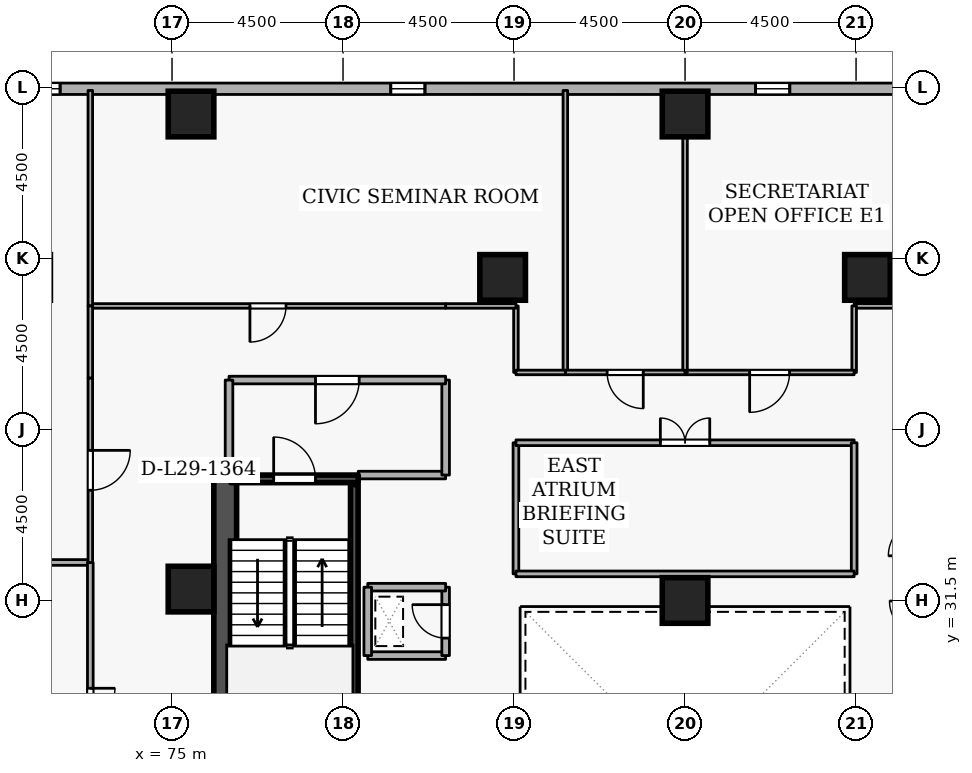
"""IFC4 building model, lengths in metres.
Left out: names, types, materials, properties, quantities, classifications, styles, units other than length and angle.
Written with IfcOpenShell. Run it as: python <this file> out.ifc"""

import sys

from ifc_helpers import new_model, si_unit, direction, frame, frame_2d, origin, origin_2d, place, context, subcontext, project, spatial, rectangle, extrude, element, fill, save


model = new_model("IFC4")
c1 = context("Model", 3, precision=1e-05, world=origin(), true_north=direction((0.0, 1.0)))
c2 = subcontext(c1, "Body", "Model", "MODEL_VIEW")
j1 = project(units=[si_unit("LENGTHUNIT", "METRE"), si_unit("PLANEANGLEUNIT", "RADIAN")], contexts=[c1])
p1 = place(None, origin())
s1 = spatial("IfcSite", under=j1, at=p1, CompositionType="ELEMENT")
p2 = place(p1, origin())
s2 = spatial("IfcBuilding", under=s1, at=p2, CompositionType="ELEMENT")
p3 = place(p2, frame((0.0, 0.0, 112.5)))
s3 = spatial("IfcBuildingStorey", under=s2, at=p3, CompositionType="ELEMENT", Elevation=112.5)
p4 = place(p3, frame((76.4, 19.2, 0.0), z_axis=(0.0, 0.0, 1.0), x_axis=(0.0, 1.0, 0.0)))
e1 = element("IfcWall", 1, at=p4, inside=s3, PredefinedType="SHEAR", context=c2, shape_type="SweptSolid", body=[
    extrude(rectangle(XDim=15.6, YDim=0.6, at=frame_2d((7.8, 0.0))), origin(), (0.0, 0.0, 1.0), 3.6),
])
for number, where, z_axis, x_axis in (
    (2, (88.5, 44.3, 0.0), (0.0, 0.0, 1.0), (1.0, 0.0, 0.0)),
    (3, (75.5, 44.3, 0.0), (0.0, 0.0, 1.0), (1.0, 0.0, 0.0)),
    (4, (93.3, 40.0, 0.0), (0.0, 0.0, 1.0), (1.0, 0.0, 0.0)),
    (5, (83.7, 40.0, 0.0), (0.0, 0.0, 1.0), (1.0, 0.0, 0.0)),
    (6, (75.5, 31.8, 0.0), (0.0, 0.0, 1.0), (1.0, 0.0, 0.0)),
    (7, (88.5, 31.5, 0.0), (0.0, 0.0, 1.0), (1.0, 0.0, 0.0)),
):
    element("IfcColumn", number, at=place(p3, frame(where, z_axis=z_axis, x_axis=x_axis)), inside=s3, PredefinedType="COLUMN", context=c2, shape_type="SweptSolid", body=[
        extrude(rectangle(XDim=1.2, YDim=1.2, at=origin_2d()), origin(), (0.0, 0.0, 1.0), 3.6),
    ])
p5 = place(p3, frame((103.555, 44.964, 0.0), z_axis=(0.0, 0.0, 1.0), x_axis=(-0.999999999641, 2.6801568e-05, 0.0)))
e8 = element("IfcWall", 8, at=p5, inside=s3, PredefinedType="STANDARD", context=c2, shape_type="SweptSolid", body=[
    extrude(rectangle(XDim=36.437, YDim=0.3, at=frame_2d((18.218, 0.0))), origin(), (0.0, 0.0, 1.0), 2.7),
])
p6 = place(p5, frame((7.5, 0.0, 0.72)))
e9 = element("IfcOpeningElement", 9, at=p6, cuts=e8, PredefinedType="OPENING", context=c2, shape_type="SweptSolid", body=[
    extrude(rectangle(XDim=0.9, YDim=1.75, at=frame_2d((0.45, 0.875))), frame((0.0, 0.16, 0.0), z_axis=(0.0, -1.0, 0.0), x_axis=(1.0, 0.0, 0.0)), (0.0, 0.0, 1.0), 0.32),
])
p7 = place(p5, frame((12.3, 0.0, 0.72)))
e10 = element("IfcOpeningElement", 10, at=p7, cuts=e8, PredefinedType="OPENING", context=c2, shape_type="SweptSolid", body=[
    extrude(rectangle(XDim=0.9, YDim=1.75, at=frame_2d((0.45, 0.875))), frame((0.0, 0.16, 0.0), z_axis=(0.0, -1.0, 0.0), x_axis=(1.0, 0.0, 0.0)), (0.0, 0.0, 1.0), 0.32),
])
p8 = place(p5, frame((21.9, 0.0, 0.72)))
e11 = element("IfcOpeningElement", 11, at=p8, cuts=e8, PredefinedType="OPENING", context=c2, shape_type="SweptSolid", body=[
    extrude(rectangle(XDim=0.9, YDim=1.75, at=frame_2d((0.45, 0.875))), frame((0.0, 0.16, 0.0), z_axis=(0.0, -1.0, 0.0), x_axis=(1.0, 0.0, 0.0)), (0.0, 0.0, 1.0), 0.32),
])
p9 = place(p5, frame((31.5, 0.0, 0.72)))
e12 = element("IfcOpeningElement", 12, at=p9, cuts=e8, PredefinedType="OPENING", context=c2, shape_type="SweptSolid", body=[
    extrude(rectangle(XDim=0.9, YDim=1.75, at=frame_2d((0.45, 0.875))), frame((0.0, 0.16, 0.0), z_axis=(0.0, -1.0, 0.0), x_axis=(1.0, 0.0, 0.0)), (0.0, 0.0, 1.0), 0.32),
])
p10 = place(p3, frame((76.55, 34.7, 0.0), z_axis=(0.0, 0.0, 1.0), x_axis=(1.0, 0.0, 0.0)))
e13 = element("IfcWall", 13, at=p10, inside=s3, PredefinedType="SHEAR", context=c2, shape_type="SweptSolid", body=[
    extrude(rectangle(XDim=3.35, YDim=0.2, at=frame_2d((1.675, 0.0))), origin(), (0.0, 0.0, 1.0), 3.6),
])
p11 = place(p10, frame((1.125, 0.0, 0.0)))
e14 = element("IfcOpeningElement", 14, at=p11, cuts=e13, PredefinedType="OPENING", context=c2, shape_type="SweptSolid", body=[
    extrude(rectangle(XDim=1.1, YDim=2.1, at=frame_2d((0.55, 1.05))), frame((0.0, 0.11, 0.0), z_axis=(0.0, -1.0, 0.0), x_axis=(1.0, 0.0, 0.0)), (0.0, 0.0, 1.0), 0.22),
])
p12 = place(p3, frame((79.797, 27.45, 0.0), z_axis=(0.0, 0.0, 1.0), x_axis=(0.0, 1.0, 0.0)))
e15 = element("IfcWall", 15, at=p12, inside=s3, PredefinedType="SHEAR", context=c2, shape_type="SweptSolid", body=[
    extrude(rectangle(XDim=7.1, YDim=0.2, at=frame_2d((3.55, 0.0))), origin(), (0.0, 0.0, 1.0), 3.6),
])
p13 = place(p3, frame((79.9, 34.8, 0.0), z_axis=(0.0, 0.0, 1.0), x_axis=(1.0, 0.0, 0.0)))
e16 = element("IfcWall", 16, at=p13, inside=s3, PredefinedType="STANDARD", context=c2, shape_type="SweptSolid", body=[
    extrude(rectangle(XDim=2.3, YDim=0.2, at=frame_2d((1.15, 0.0))), origin(), (0.0, 0.0, 1.0), 2.545),
])
p14 = place(p3, frame((82.2, 34.8, 0.0), z_axis=(0.0, 0.0, 1.0), x_axis=(0.0, 1.0, 0.0)))
e17 = element("IfcWall", 17, at=p14, inside=s3, PredefinedType="STANDARD", context=c2, shape_type="SweptSolid", body=[
    extrude(rectangle(XDim=2.5, YDim=0.2, at=frame_2d((1.25, 0.0))), origin(), (0.0, 0.0, 1.0), 3.34),
])
p15 = place(p3, frame((82.2, 37.3, 0.0), z_axis=(0.0, 0.0, 1.0), x_axis=(-1.0, 0.0, 0.0)))
e18 = element("IfcWall", 18, at=p15, inside=s3, PredefinedType="STANDARD", context=c2, shape_type="SweptSolid", body=[
    extrude(rectangle(XDim=5.7, YDim=0.2, at=frame_2d((2.85, 0.0))), origin(), (0.0, 0.0, 1.0), 3.34),
])
p16 = place(p15, frame((2.275, 0.0, 0.0)))
e19 = element("IfcOpeningElement", 19, at=p16, cuts=e18, PredefinedType="OPENING", context=c2, shape_type="SweptSolid", body=[
    extrude(rectangle(XDim=1.15, YDim=2.1, at=frame_2d((0.575, 1.05))), frame((0.0, 0.11, 0.0), z_axis=(0.0, -1.0, 0.0), x_axis=(1.0, 0.0, 0.0)), (0.0, 0.0, 1.0), 0.22),
])
p17 = place(p3, frame((76.5, 37.3, 0.0), z_axis=(0.0, 0.0, 1.0), x_axis=(0.0, -1.0, 0.0)))
e20 = element("IfcWall", 20, at=p17, inside=s3, PredefinedType="STANDARD", context=c2, shape_type="SweptSolid", body=[
    extrude(rectangle(XDim=2.5, YDim=0.2, at=frame_2d((1.25, 0.0))), origin(), (0.0, 0.0, 1.0), 3.34),
])
p18 = place(p3, frame((80.15, 30.05, 0.0), z_axis=(0.0, 0.0, 1.0), x_axis=(1.0, 0.0, 0.0)))
e21 = element("IfcWall", 21, at=p18, inside=s3, PredefinedType="STANDARD", context=c2, shape_type="SweptSolid", body=[
    extrude(rectangle(XDim=2.05, YDim=0.2, at=frame_2d((1.025, 0.0))), origin(), (0.0, 0.0, 1.0), 3.34),
])
p19 = place(p3, frame((82.2, 30.05, 0.0), z_axis=(0.0, 0.0, 1.0), x_axis=(0.0, 1.0, 0.0)))
e22 = element("IfcWall", 22, at=p19, inside=s3, PredefinedType="STANDARD", context=c2, shape_type="SweptSolid", body=[
    extrude(rectangle(XDim=1.8, YDim=0.2, at=frame_2d((0.9, 0.0))), origin(), (0.0, 0.0, 1.0), 3.34),
])
p20 = place(p19, frame((0.46, 0.0, 0.0)))
e23 = element("IfcOpeningElement", 23, at=p20, cuts=e22, PredefinedType="OPENING", context=c2, shape_type="SweptSolid", body=[
    extrude(rectangle(XDim=0.88, YDim=2.04, at=frame_2d((0.44, 1.02))), frame((0.0, 0.11, 0.0), z_axis=(0.0, -1.0, 0.0), x_axis=(1.0, 0.0, 0.0)), (0.0, 0.0, 1.0), 0.22),
])
p21 = place(p3, frame((82.2, 31.85, 0.0), z_axis=(0.0, 0.0, 1.0), x_axis=(-1.0, 0.0, 0.0)))
e24 = element("IfcWall", 24, at=p21, inside=s3, PredefinedType="STANDARD", context=c2, shape_type="SweptSolid", body=[
    extrude(rectangle(XDim=2.05, YDim=0.2, at=frame_2d((1.025, 0.0))), origin(), (0.0, 0.0, 1.0), 3.34),
])
p22 = place(p3, frame((80.15, 31.85, 0.0), z_axis=(0.0, 0.0, 1.0), x_axis=(0.0, -1.0, 0.0)))
e25 = element("IfcWall", 25, at=p22, inside=s3, PredefinedType="STANDARD", context=c2, shape_type="SweptSolid", body=[
    extrude(rectangle(XDim=1.8, YDim=0.2, at=frame_2d((0.9, 0.0))), origin(), (0.0, 0.0, 1.0), 3.34),
])
p23 = place(p3, frame((94.8, 39.25, 0.0), z_axis=(0.0, 0.0, 1.0), x_axis=(-1.0, 0.0, 0.0)))
e26 = element("IfcWall", 26, at=p23, inside=s3, PredefinedType="PARTITIONING", context=c2, shape_type="SweptSolid", body=[
    extrude(rectangle(XDim=1.85, YDim=0.12, at=frame_2d((0.925, 0.0))), origin(), (0.0, 0.0, 1.0), 3.34),
])
p24 = place(p3, frame((92.95, 39.25, 0.0), z_axis=(0.0, 0.0, 1.0), x_axis=(0.0, -1.0, 0.0)))
e27 = element("IfcWall", 27, at=p24, inside=s3, PredefinedType="PARTITIONING", context=c2, shape_type="SweptSolid", body=[
    extrude(rectangle(XDim=1.75, YDim=0.12, at=frame_2d((0.875, 0.0))), origin(), (0.0, 0.0, 1.0), 3.34),
])
p25 = place(p3, frame((92.95, 37.5, 0.0), z_axis=(0.0, 0.0, 1.0), x_axis=(-1.0, 0.0, 0.0)))
e28 = element("IfcWall", 28, at=p25, inside=s3, PredefinedType="PARTITIONING", context=c2, shape_type="SweptSolid", body=[
    extrude(rectangle(XDim=4.45, YDim=0.12, at=frame_2d((2.225, 0.0))), origin(), (0.0, 0.0, 1.0), 3.34),
])
p26 = place(p25, frame((1.7, 0.0, 0.0)))
e29 = element("IfcOpeningElement", 29, at=p26, cuts=e28, PredefinedType="OPENING", context=c2, shape_type="SweptSolid", body=[
    extrude(rectangle(XDim=1.05, YDim=2.1, at=frame_2d((0.525, 1.05))), frame((0.0, 0.07, 0.0), z_axis=(0.0, -1.0, 0.0), x_axis=(1.0, 0.0, 0.0)), (0.0, 0.0, 1.0), 0.14),
])
p27 = place(p3, frame((88.5, 37.5, 0.0), z_axis=(0.0, 0.0, 1.0), x_axis=(0.0, 1.0, 0.0)))
e30 = element("IfcWall", 30, at=p27, inside=s3, PredefinedType="PARTITIONING", context=c2, shape_type="SweptSolid", body=[
    extrude(rectangle(XDim=7.42, YDim=0.12, at=frame_2d((3.71, 0.0))), origin(), (0.0, 0.0, 1.0), 2.882),
])
p28 = place(p3, frame((85.35, 37.5, 0.0), z_axis=(0.0, 0.0, 1.0), x_axis=(0.0, 1.0, 0.0)))
e31 = element("IfcWall", 31, at=p28, inside=s3, PredefinedType="PARTITIONING", context=c2, shape_type="SweptSolid", body=[
    extrude(rectangle(XDim=7.42, YDim=0.12, at=frame_2d((3.71, 0.0))), origin(), (0.0, 0.0, 1.0), 3.34),
])
p29 = place(p3, frame((88.5, 37.5, 0.0), z_axis=(0.0, 0.0, 1.0), x_axis=(-1.0, 0.0, 0.0)))
e32 = element("IfcWall", 32, at=p29, inside=s3, PredefinedType="PARTITIONING", context=c2, shape_type="SweptSolid", body=[
    extrude(rectangle(XDim=3.15, YDim=0.12, at=frame_2d((1.575, 0.0))), origin(), (0.0, 0.0, 1.0), 3.34),
])
p30 = place(p29, frame((1.1, 0.0, 0.0)))
e33 = element("IfcOpeningElement", 33, at=p30, cuts=e32, PredefinedType="OPENING", context=c2, shape_type="SweptSolid", body=[
    extrude(rectangle(XDim=0.95, YDim=2.1, at=frame_2d((0.475, 1.05))), frame((0.0, 0.07, 0.0), z_axis=(0.0, -1.0, 0.0), x_axis=(1.0, 0.0, 0.0)), (0.0, 0.0, 1.0), 0.14),
])
p31 = place(p3, frame((84.05, 37.5, 0.0), z_axis=(0.0, 0.0, 1.0), x_axis=(0.0, 1.0, 0.0)))
e34 = element("IfcWall", 34, at=p31, inside=s3, PredefinedType="PARTITIONING", context=c2, shape_type="SweptSolid", body=[
    extrude(rectangle(XDim=1.75, YDim=0.12, at=frame_2d((0.875, 0.0))), origin(), (0.0, 0.0, 1.0), 3.34),
])
p32 = place(p3, frame((84.05, 39.25, 0.0), z_axis=(0.0, 0.0, 1.0), x_axis=(-1.0, 0.0, 0.0)))
e35 = element("IfcWall", 35, at=p32, inside=s3, PredefinedType="PARTITIONING", context=c2, shape_type="SweptSolid", body=[
    extrude(rectangle(XDim=1.85, YDim=0.12, at=frame_2d((0.925, 0.0))), origin(), (0.0, 0.0, 1.0), 3.34),
])
p33 = place(p3, frame((82.2, 39.25, 0.0), z_axis=(0.0, 0.0, 1.0), x_axis=(-1.0, 0.0, 0.0)))
e36 = element("IfcWall", 36, at=p33, inside=s3, PredefinedType="PARTITIONING", context=c2, shape_type="SweptSolid", body=[
    extrude(rectangle(XDim=9.35, YDim=0.12, at=frame_2d((4.675, 0.0))), origin(), (0.0, 0.0, 1.0), 3.34),
])
p34 = place(p33, frame((4.2, 0.0, 0.0)))
e37 = element("IfcOpeningElement", 37, at=p34, cuts=e36, PredefinedType="OPENING", context=c2, shape_type="SweptSolid", body=[
    extrude(rectangle(XDim=0.95, YDim=2.1, at=frame_2d((0.475, 1.05))), frame((0.0, 0.07, 0.0), z_axis=(0.0, -1.0, 0.0), x_axis=(1.0, 0.0, 0.0)), (0.0, 0.0, 1.0), 0.14),
])
p35 = place(p3, frame((72.85, 39.25, 0.0), z_axis=(0.0, 0.0, 1.0), x_axis=(0.0, 1.0, 0.0)))
e38 = element("IfcWall", 38, at=p35, inside=s3, PredefinedType="PARTITIONING", context=c2, shape_type="SweptSolid", body=[
    extrude(rectangle(XDim=5.67, YDim=0.12, at=frame_2d((2.835, 0.0))), origin(), (0.0, 0.0, 1.0), 3.34),
])
p36 = place(p3, frame((85.35, 37.5, 0.0), z_axis=(0.0, 0.0, 1.0), x_axis=(-1.0, 0.0, 0.0)))
e39 = element("IfcWall", 39, at=p36, inside=s3, PredefinedType="PARTITIONING", context=c2, shape_type="SweptSolid", body=[
    extrude(rectangle(XDim=1.3, YDim=0.12, at=frame_2d((0.65, 0.0))), origin(), (0.0, 0.0, 1.0), 3.34),
])
p37 = place(p3, frame((84.05, 32.2, 0.0), z_axis=(0.0, 0.0, 1.0), x_axis=(0.0, 1.0, 0.0)))
e40 = element("IfcWall", 40, at=p37, inside=s3, PredefinedType="PARTITIONING", context=c2, shape_type="SweptSolid", body=[
    extrude(rectangle(XDim=3.45, YDim=0.15, at=frame_2d((1.725, 0.0))), origin(), (0.0, 0.0, 1.0), 3.34),
])
p38 = place(p3, frame((84.05, 35.65, 0.0), z_axis=(0.0, 0.0, 1.0), x_axis=(1.0, 0.0, 0.0)))
e41 = element("IfcWall", 41, at=p38, inside=s3, PredefinedType="PARTITIONING", context=c2, shape_type="SweptSolid", body=[
    extrude(rectangle(XDim=8.9, YDim=0.15, at=frame_2d((4.45, 0.0))), origin(), (0.0, 0.0, 1.0), 3.34),
])
p39 = place(p38, frame((3.8, 0.0, 0.0)))
e42 = element("IfcOpeningElement", 42, at=p39, cuts=e41, PredefinedType="OPENING", context=c2, shape_type="SweptSolid", body=[
    extrude(rectangle(XDim=1.3, YDim=2.12, at=frame_2d((0.65, 1.06))), frame((0.0, 0.085, 0.0), z_axis=(0.0, -1.0, 0.0), x_axis=(1.0, 0.0, 0.0)), (0.0, 0.0, 1.0), 0.17),
])
p40 = place(p3, frame((92.95, 35.65, 0.0), z_axis=(0.0, 0.0, 1.0), x_axis=(0.0, -1.0, 0.0)))
e43 = element("IfcWall", 43, at=p40, inside=s3, PredefinedType="PARTITIONING", context=c2, shape_type="SweptSolid", body=[
    extrude(rectangle(XDim=3.45, YDim=0.15, at=frame_2d((1.725, 0.0))), origin(), (0.0, 0.0, 1.0), 3.34),
])
p41 = place(p3, frame((92.95, 32.2, 0.0), z_axis=(0.0, 0.0, 1.0), x_axis=(-1.0, 0.0, 0.0)))
e44 = element("IfcWall", 44, at=p41, inside=s3, PredefinedType="PARTITIONING", context=c2, shape_type="SweptSolid", body=[
    extrude(rectangle(XDim=8.9, YDim=0.15, at=frame_2d((4.45, 0.0))), origin(), (0.0, 0.0, 1.0), 3.34),
])
p42 = place(p3, frame((64.58, 32.5, 0.0), z_axis=(0.0, 0.0, 1.0), x_axis=(1.0, 0.0, 0.0)))
e45 = element("IfcWall", 45, at=p42, inside=s3, PredefinedType="PARTITIONING", context=c2, shape_type="SweptSolid", body=[
    extrude(rectangle(XDim=8.27, YDim=0.15, at=frame_2d((4.135, 0.0))), origin(), (0.0, 0.0, 1.0), 3.34),
])
p43 = place(p3, frame((72.85, 32.5, 0.0), z_axis=(0.0, 0.0, 1.0), x_axis=(0.0, -1.0, 0.0)))
e46 = element("IfcWall", 46, at=p43, inside=s3, PredefinedType="PARTITIONING", context=c2, shape_type="SweptSolid", body=[
    extrude(rectangle(XDim=11.0, YDim=0.15, at=frame_2d((5.5, 0.0))), origin(), (0.0, 0.0, 1.0), 3.34),
])
p44 = place(p43, frame((3.31, 0.0, 0.0)))
e47 = element("IfcOpeningElement", 47, at=p44, cuts=e46, PredefinedType="OPENING", context=c2, shape_type="SweptSolid", body=[
    extrude(rectangle(XDim=1.3, YDim=2.12, at=frame_2d((0.65, 1.06))), frame((0.0, 0.085, 0.0), z_axis=(0.0, -1.0, 0.0), x_axis=(1.0, 0.0, 0.0)), (0.0, 0.0, 1.0), 0.17),
])
p45 = place(p3, frame((72.85, 39.25, 0.0), z_axis=(0.0, 0.0, 1.0), x_axis=(0.0, -1.0, 0.0)))
e48 = element("IfcWall", 48, at=p45, inside=s3, PredefinedType="PARTITIONING", context=c2, shape_type="SweptSolid", body=[
    extrude(rectangle(XDim=1.9, YDim=0.12, at=frame_2d((0.95, 0.0))), origin(), (0.0, 0.0, 1.0), 3.34),
])
p46 = place(p3, frame((72.85, 37.35, 0.0), z_axis=(0.0, 0.0, 1.0), x_axis=(0.0, -1.0, 0.0)))
e49 = element("IfcWall", 49, at=p46, inside=s3, PredefinedType="PARTITIONING", context=c2, shape_type="SweptSolid", body=[
    extrude(rectangle(XDim=4.85, YDim=0.12, at=frame_2d((2.425, 0.0))), origin(), (0.0, 0.0, 1.0), 2.895),
])
p47 = place(p46, frame((1.9, 0.0, 0.0)))
e50 = element("IfcOpeningElement", 50, at=p47, cuts=e49, PredefinedType="OPENING", context=c2, shape_type="SweptSolid", body=[
    extrude(rectangle(XDim=1.05, YDim=2.1, at=frame_2d((0.525, 1.05))), frame((0.0, 0.07, 0.0), z_axis=(0.0, -1.0, 0.0), x_axis=(1.0, 0.0, 0.0)), (0.0, 0.0, 1.0), 0.14),
])
p48 = place(p7, origin())
e51 = element("IfcWindow", 51, at=p48, inside=s3, PartitioningType="SINGLE_PANEL", PredefinedType="WINDOW", context=c2, shape_type="SweptSolid", body=[
    extrude(rectangle(XDim=0.9, YDim=1.75, at=frame_2d((0.45, 0.875))), frame((0.0, 0.03, 0.0), z_axis=(0.0, -1.0, 0.0), x_axis=(1.0, 0.0, 0.0)), (0.0, 0.0, 1.0), 0.06),
])
fill(e10, e51)
p49 = place(p8, origin())
e52 = element("IfcWindow", 52, at=p49, inside=s3, PartitioningType="SINGLE_PANEL", PredefinedType="WINDOW", context=c2, shape_type="SweptSolid", body=[
    extrude(rectangle(XDim=0.9, YDim=1.75, at=frame_2d((0.45, 0.875))), frame((0.0, 0.03, 0.0), z_axis=(0.0, -1.0, 0.0), x_axis=(1.0, 0.0, 0.0)), (0.0, 0.0, 1.0), 0.06),
])
fill(e11, e52)
p50 = place(p9, origin())
e53 = element("IfcWindow", 53, at=p50, inside=s3, PartitioningType="SINGLE_PANEL", PredefinedType="WINDOW", context=c2, shape_type="SweptSolid", body=[
    extrude(rectangle(XDim=0.9, YDim=1.75, at=frame_2d((0.45, 0.875))), frame((0.0, 0.03, 0.0), z_axis=(0.0, -1.0, 0.0), x_axis=(1.0, 0.0, 0.0)), (0.0, 0.0, 1.0), 0.06),
])
fill(e12, e53)
p51 = place(p11, origin())
e54 = element("IfcDoor", 54, at=p51, inside=s3, OperationType="SINGLE_SWING_LEFT", PredefinedType="DOOR", context=c2, shape_type="SweptSolid", body=[
    extrude(rectangle(XDim=1.1, YDim=2.1, at=frame_2d((0.55, 1.05))), frame((0.0, 0.025, 0.0), z_axis=(0.0, -1.0, 0.0), x_axis=(1.0, 0.0, 0.0)), (0.0, 0.0, 1.0), 0.05),
])
fill(e14, e54)
p52 = place(p16, origin())
e55 = element("IfcDoor", 55, at=p52, inside=s3, OperationType="SINGLE_SWING_RIGHT", PredefinedType="DOOR", context=c2, shape_type="SweptSolid", body=[
    extrude(rectangle(XDim=1.15, YDim=2.1, at=frame_2d((0.575, 1.05))), frame((0.0, 0.025, 0.0), z_axis=(0.0, -1.0, 0.0), x_axis=(1.0, 0.0, 0.0)), (0.0, 0.0, 1.0), 0.05),
])
fill(e19, e55)
p53 = place(p20, origin())
e56 = element("IfcDoor", 56, at=p53, inside=s3, OperationType="SINGLE_SWING_RIGHT", PredefinedType="DOOR", context=c2, shape_type="SweptSolid", body=[
    extrude(rectangle(XDim=0.88, YDim=2.04, at=frame_2d((0.44, 1.02))), frame((0.0, 0.025, 0.0), z_axis=(0.0, -1.0, 0.0), x_axis=(1.0, 0.0, 0.0)), (0.0, 0.0, 1.0), 0.05),
])
fill(e23, e56)
p54 = place(p26, origin())
e57 = element("IfcDoor", 57, at=p54, inside=s3, OperationType="SINGLE_SWING_RIGHT", PredefinedType="DOOR", context=c2, shape_type="SweptSolid", body=[
    extrude(rectangle(XDim=1.05, YDim=2.1, at=frame_2d((0.525, 1.05))), frame((0.0, 0.025, 0.0), z_axis=(0.0, -1.0, 0.0), x_axis=(1.0, 0.0, 0.0)), (0.0, 0.0, 1.0), 0.05),
])
fill(e29, e57)
p55 = place(p30, origin())
e58 = element("IfcDoor", 58, at=p55, inside=s3, OperationType="SINGLE_SWING_LEFT", PredefinedType="DOOR", context=c2, shape_type="SweptSolid", body=[
    extrude(rectangle(XDim=0.95, YDim=2.1, at=frame_2d((0.475, 1.05))), frame((0.0, 0.025, 0.0), z_axis=(0.0, -1.0, 0.0), x_axis=(1.0, 0.0, 0.0)), (0.0, 0.0, 1.0), 0.05),
])
fill(e33, e58)
p56 = place(p34, origin())
e59 = element("IfcDoor", 59, at=p56, inside=s3, OperationType="SINGLE_SWING_RIGHT", PredefinedType="DOOR", context=c2, shape_type="SweptSolid", body=[
    extrude(rectangle(XDim=0.95, YDim=2.1, at=frame_2d((0.475, 1.05))), frame((0.0, 0.025, 0.0), z_axis=(0.0, -1.0, 0.0), x_axis=(1.0, 0.0, 0.0)), (0.0, 0.0, 1.0), 0.05),
])
fill(e37, e59)
p57 = place(p39, origin())
e60 = element("IfcDoor", 60, at=p57, inside=s3, OperationType="DOUBLE_DOOR_SINGLE_SWING", PredefinedType="DOOR", context=c2, shape_type="SweptSolid", body=[
    extrude(rectangle(XDim=1.3, YDim=2.12, at=frame_2d((0.65, 1.06))), frame((0.0, 0.025, 0.0), z_axis=(0.0, -1.0, 0.0), x_axis=(1.0, 0.0, 0.0)), (0.0, 0.0, 1.0), 0.05),
])
fill(e42, e60)
p58 = place(p44, origin())
e61 = element("IfcDoor", 61, at=p58, inside=s3, OperationType="DOUBLE_DOOR_SINGLE_SWING", PredefinedType="DOOR", context=c2, shape_type="SweptSolid", body=[
    extrude(rectangle(XDim=1.3, YDim=2.12, at=frame_2d((0.65, 1.06))), frame((0.0, 0.025, 0.0), z_axis=(0.0, -1.0, 0.0), x_axis=(1.0, 0.0, 0.0)), (0.0, 0.0, 1.0), 0.05),
])
fill(e47, e61)
p59 = place(p47, origin())
e62 = element("IfcDoor", 62, at=p59, inside=s3, OperationType="SINGLE_SWING_LEFT", PredefinedType="DOOR", context=c2, shape_type="SweptSolid", body=[
    extrude(rectangle(XDim=1.05, YDim=2.1, at=frame_2d((0.525, 1.05))), frame((0.0, 0.025, 0.0), z_axis=(0.0, -1.0, 0.0), x_axis=(1.0, 0.0, 0.0)), (0.0, 0.0, 1.0), 0.05),
])
fill(e50, e62)
save(model, sys.argv[1])
